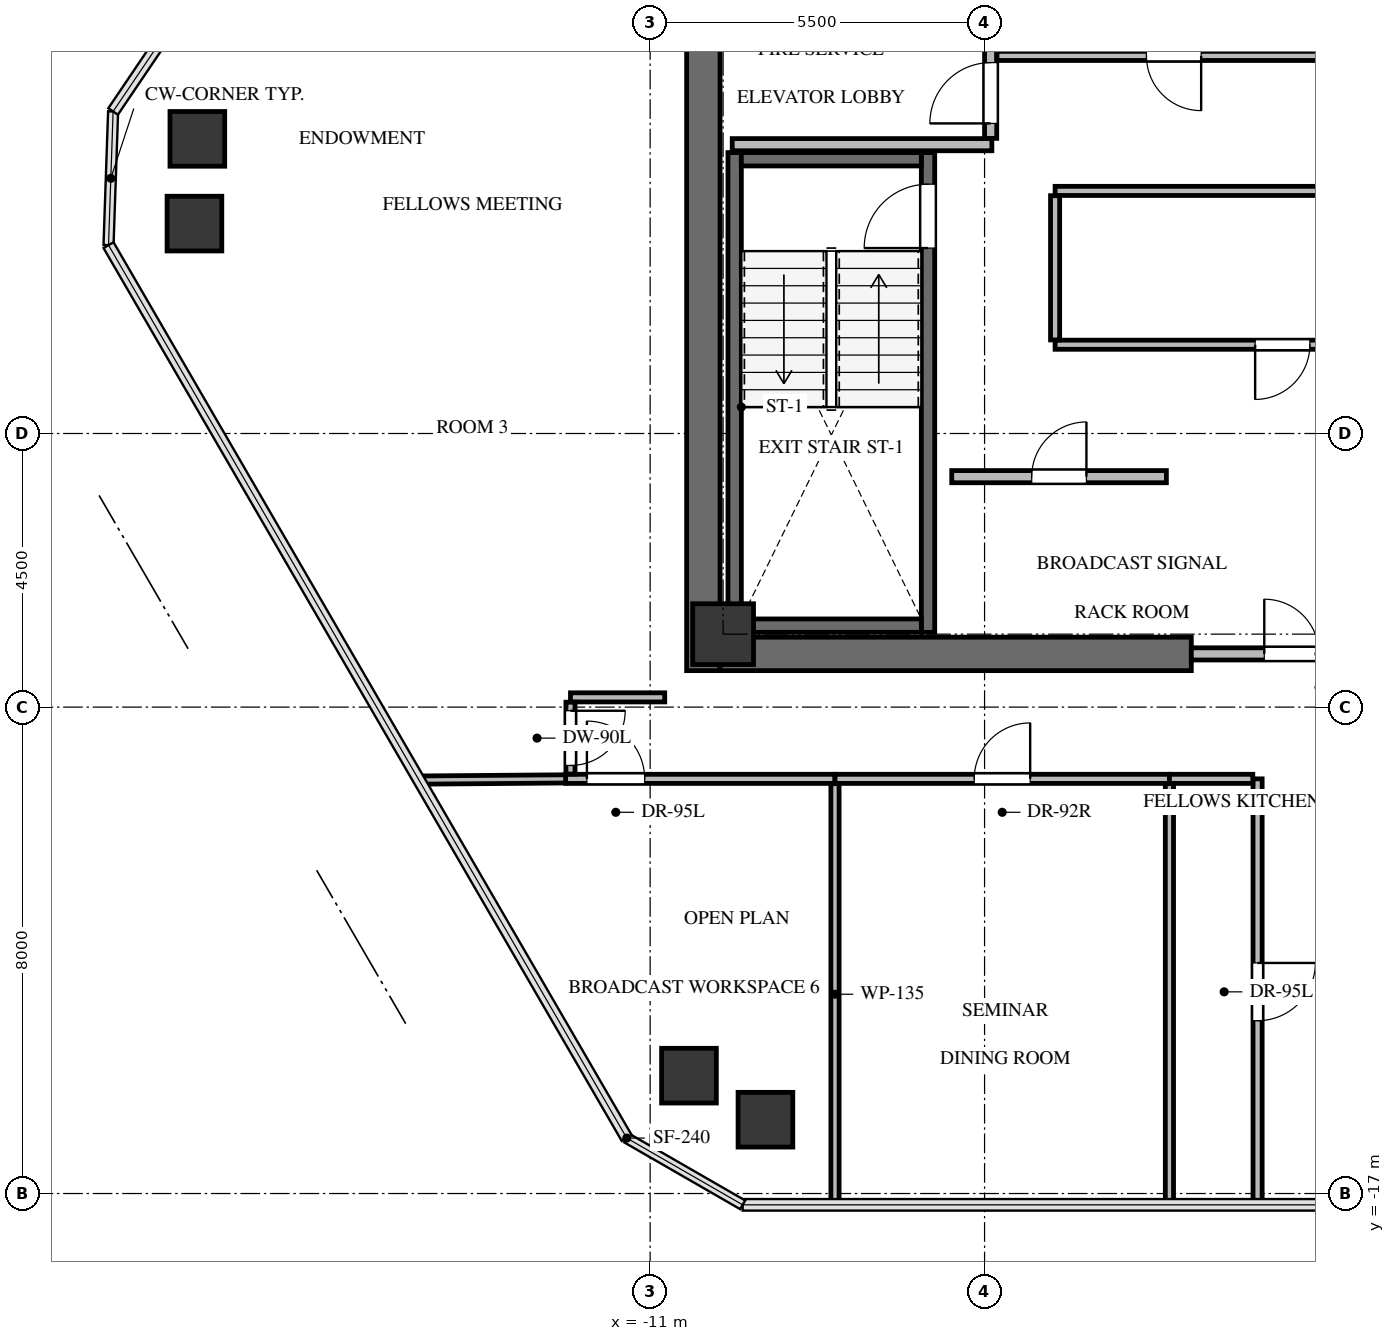
"""IFC4 building model, lengths in metres.
Left out: names, types, materials, properties, quantities, classifications, styles, units other than length and angle.
Written with IfcOpenShell. Run it as: python <this file> out.ifc"""

import sys

from ifc_helpers import new_model, si_unit, direction, frame, frame_2d, origin, origin_2d, place, context, subcontext, project, spatial, rectangle, extrude, source, transform, mapped, element, fill, save


model = new_model("IFC4")
c1 = context("Model", 3, precision=1e-05, world=origin(), true_north=direction((0.0, 1.0)))
c2 = subcontext(c1, "Body", "Model", "MODEL_VIEW")
j1 = project(units=[si_unit("LENGTHUNIT", "METRE"), si_unit("PLANEANGLEUNIT", "RADIAN")], contexts=[c1])
p1 = place(None, origin())
s1 = spatial("IfcSite", under=j1, at=p1, CompositionType="ELEMENT")
p2 = place(p1, origin())
s2 = spatial("IfcBuilding", under=s1, at=p2, CompositionType="ELEMENT")
p3 = place(p2, frame((0.0, 0.0, 251.3)))
s3 = spatial("IfcBuildingStorey", under=s2, at=p3, CompositionType="ELEMENT", Elevation=251.3)
p4 = place(p3, frame((-10.125, -8.4, 0.0), z_axis=(0.0, 0.0, 1.0), x_axis=(0.0, 1.0, 0.0)))
e1 = element("IfcWall", 1, at=p4, inside=s3, PredefinedType="SHEAR", context=c2, shape_type="SweptSolid", body=[
    extrude(rectangle(XDim=16.8, YDim=0.55, at=frame_2d((8.4, 0.0))), origin(), (0.0, 0.0, 1.0), 3.4),
])
p5 = place(p3, frame((-9.85, -8.125, 0.0), z_axis=(0.0, 0.0, 1.0), x_axis=(1.0, 0.0, 0.0)))
e2 = element("IfcWall", 2, at=p5, inside=s3, PredefinedType="SHEAR", context=c2, shape_type="SweptSolid", body=[
    extrude(rectangle(XDim=7.75, YDim=0.55, at=frame_2d((3.875, 0.0))), origin(), (0.0, 0.0, 1.0), 3.4),
])
p6 = place(p3, frame((-6.43, -7.77, -0.24), z_axis=(0.0, 0.0, 1.0), x_axis=(0.0, 1.0, 0.0)))
e3 = element("IfcWall", 3, at=p6, inside=s3, PredefinedType="SHEAR", context=c2, shape_type="SweptSolid", body=[
    extrude(rectangle(XDim=7.89, YDim=0.22, at=frame_2d((3.945, 0.0))), origin(), (0.0, 0.0, 1.0), 3.4),
])
p7 = place(p6, frame((6.32, 0.0, 0.0)))
e4 = element("IfcOpeningElement", 4, at=p7, cuts=e3, PredefinedType="OPENING", context=c2, shape_type="SweptSolid", body=[
    extrude(rectangle(XDim=1.05, YDim=2.15, at=frame_2d((0.525, 1.075))), frame((0.0, 0.12, 0.0), z_axis=(0.0, -1.0, 0.0), x_axis=(1.0, 0.0, 0.0)), (0.0, 0.0, 1.0), 0.24),
])
p8 = place(p3, frame((-9.61, 0.12, -0.24), z_axis=(0.0, 0.0, 1.0), x_axis=(0.0, -1.0, 0.0)))
e5 = element("IfcWall", 5, at=p8, inside=s3, PredefinedType="SHEAR", context=c2, shape_type="SweptSolid", body=[
    extrude(rectangle(XDim=7.89, YDim=0.22, at=frame_2d((3.945, 0.0))), origin(), (0.0, 0.0, 1.0), 3.4),
])
for number, where, z_axis, x_axis in (
    (6, (-9.5, -7.66, -0.24), (0.0, 0.0, 1.0), (1.0, 0.0, 0.0)),
    (7, (-6.54, 0.01, -0.24), (0.0, 0.0, 1.0), (-1.0, 0.0, 0.0)),
):
    element("IfcWall", number, at=place(p3, frame(where, z_axis=z_axis, x_axis=x_axis)), inside=s3, PredefinedType="SHEAR", context=c2, shape_type="SweptSolid", body=[
        extrude(rectangle(XDim=2.96, YDim=0.22, at=frame_2d((1.48, 0.0))), origin(), (0.0, 0.0, 1.0), 3.4),
    ])
m1 = source(origin(), c2, "Body", "SweptSolid", [
    extrude(rectangle(XDim=1.0, YDim=1.0, at=origin_2d()), origin(), (0.0, 0.0, 1.0), 3.4),
])
p9 = place(p3, frame((-9.8, -7.8, -0.24), z_axis=(0.0, 0.0, 1.0), x_axis=(1.0, 0.0, 0.0)))
e8 = element("IfcColumn", 8, at=p9, inside=s3, PredefinedType="COLUMN", context=c2, shape_type="MappedRepresentation", body=[
    mapped(m1, transform((0.0, 0.0, 0.0), x_axis=(1.0, 0.0, 0.0), y_axis=(0.0, 1.0, 0.0), z_axis=(0.0, 0.0, 1.0), scale=1.0)),
])
m2 = source(origin(), c2, "Body", "SweptSolid", [
    extrude(rectangle(XDim=0.9, YDim=0.9, at=origin_2d()), origin(), (0.0, 0.0, 1.0), 3.4),
])
for number, where, z_axis, x_axis in (
    (9, (-10.361, -15.062, -0.24), (0.0, 0.0, 1.0), (1.0, 0.0, 0.0)),
    (10, (-18.494, -1.048, -0.24), (0.0, 0.0, 1.0), (1.0, 0.0, 0.0)),
    (11, (-18.446, 0.346, -0.24), (0.0, 0.0, 1.0), (1.0, 0.0, 0.0)),
    (12, (-9.104, -15.786, -0.24), (0.0, 0.0, 1.0), (1.0, 0.0, 0.0)),
):
    element("IfcColumn", number, at=place(p3, frame(where, z_axis=z_axis, x_axis=x_axis)), inside=s3, PredefinedType="COLUMN", context=c2, shape_type="MappedRepresentation", body=[
        mapped(m2, transform((0.0, 0.0, 0.0), x_axis=(1.0, 0.0, 0.0), y_axis=(0.0, 1.0, 0.0), z_axis=(0.0, 0.0, 1.0), scale=1.0)),
    ])
p10 = place(p3, frame((-2.1, -8.125, 0.0), z_axis=(0.0, 0.0, 1.0), x_axis=(1.0, 0.0, 0.0)))
e13 = element("IfcWall", 13, at=p10, inside=s3, PredefinedType="SOLIDWALL", context=c2, shape_type="SweptSolid", body=[
    extrude(rectangle(XDim=4.2, YDim=0.2, at=frame_2d((2.1, 0.0))), origin(), (0.0, 0.0, 1.0), 3.145),
])
p11 = place(p10, frame((1.2, 0.0, 0.0)))
e14 = element("IfcOpeningElement", 14, at=p11, cuts=e13, PredefinedType="OPENING", context=c2, shape_type="SweptSolid", body=[
    extrude(rectangle(XDim=1.8, YDim=2.15, at=frame_2d((0.9, 1.075))), frame((0.0, 0.11, 0.0), z_axis=(0.0, -1.0, 0.0), x_axis=(1.0, 0.0, 0.0)), (0.0, 0.0, 1.0), 0.22),
])
p12 = place(p3, frame((-9.65, 0.25, 0.0), z_axis=(0.0, 0.0, 1.0), x_axis=(1.0, 0.0, 0.0)))
e15 = element("IfcWall", 15, at=p12, inside=s3, PredefinedType="SOLIDWALL", context=c2, shape_type="SweptSolid", body=[
    extrude(rectangle(XDim=4.27, YDim=0.2, at=frame_2d((2.135, 0.0))), origin(), (0.0, 0.0, 1.0), 3.145),
])
p13 = place(p3, frame((-5.4, 0.354, 0.0), z_axis=(0.0, 0.0, 1.0), x_axis=(0.0, 1.0, 0.0)))
e16 = element("IfcWall", 16, at=p13, inside=s3, PredefinedType="SOLIDWALL", context=c2, shape_type="SweptSolid", body=[
    extrude(rectangle(XDim=4.026, YDim=0.2, at=frame_2d((2.013, 0.0))), origin(), (0.0, 0.0, 1.0), 3.145),
])
p14 = place(p13, frame((0.246, 0.0, 0.0)))
e17 = element("IfcOpeningElement", 17, at=p14, cuts=e16, PredefinedType="OPENING", context=c2, shape_type="SweptSolid", body=[
    extrude(rectangle(XDim=1.0, YDim=2.15, at=frame_2d((0.5, 1.075))), frame((0.0, 0.11, 0.0), z_axis=(0.0, -1.0, 0.0), x_axis=(1.0, 0.0, 0.0)), (0.0, 0.0, 1.0), 0.22),
])
p15 = place(p3, frame((-6.04, -5.21, 0.0), z_axis=(0.0, 0.0, 1.0), x_axis=(1.0, 0.0, 0.0)))
e18 = element("IfcWall", 18, at=p15, inside=s3, PredefinedType="SOLIDWALL", context=c2, shape_type="SweptSolid", body=[
    extrude(rectangle(XDim=3.53, YDim=0.2, at=frame_2d((1.765, 0.0))), origin(), (0.0, 0.0, 1.0), 3.145),
])
p16 = place(p15, frame((1.315, 0.0, 0.0)))
e19 = element("IfcOpeningElement", 19, at=p16, cuts=e18, PredefinedType="OPENING", context=c2, shape_type="SweptSolid", body=[
    extrude(rectangle(XDim=0.9, YDim=2.05, at=frame_2d((0.45, 1.025))), frame((0.0, 0.11, 0.0), z_axis=(0.0, -1.0, 0.0), x_axis=(1.0, 0.0, 0.0)), (0.0, 0.0, 1.0), 0.22),
])
p17 = place(p3, frame((3.14, -3.04, 0.0), z_axis=(0.0, 0.0, 1.0), x_axis=(-1.0, 0.0, 0.0)))
e20 = element("IfcWall", 20, at=p17, inside=s3, PredefinedType="PARTITIONING", context=c2, shape_type="SweptSolid", body=[
    extrude(rectangle(XDim=7.48, YDim=0.15, at=frame_2d((3.74, 0.0))), origin(), (0.0, 0.0, 1.0), 3.145),
])
p18 = place(p17, frame((3.29, 0.0, 0.0)))
e21 = element("IfcOpeningElement", 21, at=p18, cuts=e20, PredefinedType="OPENING", context=c2, shape_type="SweptSolid", body=[
    extrude(rectangle(XDim=0.9, YDim=2.05, at=frame_2d((0.45, 1.025))), frame((0.0, 0.085, 0.0), z_axis=(0.0, -1.0, 0.0), x_axis=(1.0, 0.0, 0.0)), (0.0, 0.0, 1.0), 0.17),
])
p19 = place(p3, frame((-4.34, -0.51, 0.0), z_axis=(0.0, 0.0, 1.0), x_axis=(1.0, 0.0, 0.0)))
e22 = element("IfcWall", 22, at=p19, inside=s3, PredefinedType="PARTITIONING", context=c2, shape_type="SweptSolid", body=[
    extrude(rectangle(XDim=7.48, YDim=0.15, at=frame_2d((3.74, 0.0))), origin(), (0.0, 0.0, 1.0), 3.145),
])
p20 = place(p3, frame((-4.34, -2.961, 0.0), z_axis=(0.0, 0.0, 1.0), x_axis=(0.0, 1.0, 0.0)))
e23 = element("IfcWall", 23, at=p20, inside=s3, PredefinedType="PARTITIONING", context=c2, shape_type="SweptSolid", body=[
    extrude(rectangle(XDim=2.372, YDim=0.15, at=frame_2d((1.186, 0.0))), origin(), (0.0, 0.0, 1.0), 3.145),
])
p21 = place(p3, frame((0.52, 1.71, 0.0), z_axis=(0.0, 0.0, 1.0), x_axis=(-1.0, 0.0, 0.0)))
e24 = element("IfcWall", 24, at=p21, inside=s3, PredefinedType="PARTITIONING", context=c2, shape_type="SweptSolid", body=[
    extrude(rectangle(XDim=5.816, YDim=0.15, at=frame_2d((2.908, 0.0))), origin(), (0.0, 0.0, 1.0), 3.145),
])
p22 = place(p21, frame((2.458, 0.0, 0.0)))
e25 = element("IfcOpeningElement", 25, at=p22, cuts=e24, PredefinedType="OPENING", context=c2, shape_type="SweptSolid", body=[
    extrude(rectangle(XDim=0.9, YDim=2.05, at=frame_2d((0.45, 1.025))), frame((0.0, 0.085, 0.0), z_axis=(0.0, -1.0, 0.0), x_axis=(1.0, 0.0, 0.0)), (0.0, 0.0, 1.0), 0.17),
])
p23 = place(p3, frame((-12.39, -10.18, 0.0), z_axis=(0.0, 0.0, 1.0), x_axis=(1.0, 0.0, 0.0)))
e26 = element("IfcWall", 26, at=p23, inside=s3, PredefinedType="PARTITIONING", context=c2, shape_type="SweptSolid", body=[
    extrude(rectangle(XDim=4.43, YDim=0.15, at=frame_2d((2.215, 0.0))), origin(), (0.0, 0.0, 1.0), 3.145),
])
p24 = place(p23, frame((0.35, 0.0, 0.0)))
e27 = element("IfcOpeningElement", 27, at=p24, cuts=e26, PredefinedType="OPENING", context=c2, shape_type="SweptSolid", body=[
    extrude(rectangle(XDim=0.95, YDim=2.1, at=frame_2d((0.475, 1.05))), frame((0.0, 0.085, 0.0), z_axis=(0.0, -1.0, 0.0), x_axis=(1.0, 0.0, 0.0)), (0.0, 0.0, 1.0), 0.17),
])
p25 = place(p3, frame((-7.96, -10.18, 0.0), z_axis=(0.0, 0.0, 1.0), x_axis=(1.0, 0.0, 0.0)))
e28 = element("IfcWall", 28, at=p25, inside=s3, PredefinedType="PARTITIONING", context=c2, shape_type="SweptSolid", body=[
    extrude(rectangle(XDim=5.5, YDim=0.15, at=frame_2d((2.75, 0.0))), origin(), (0.0, 0.0, 1.0), 2.401),
])
p26 = place(p25, frame((2.29, 0.0, 0.0)))
e29 = element("IfcOpeningElement", 29, at=p26, cuts=e28, PredefinedType="OPENING", context=c2, shape_type="SweptSolid", body=[
    extrude(rectangle(XDim=0.92, YDim=2.1, at=frame_2d((0.46, 1.05))), frame((0.0, 0.085, 0.0), z_axis=(0.0, -1.0, 0.0), x_axis=(1.0, 0.0, 0.0)), (0.0, 0.0, 1.0), 0.17),
])
p27 = place(p3, frame((-1.01, -10.18, 0.0), z_axis=(0.0, 0.0, 1.0), x_axis=(0.0, -1.0, 0.0)))
e30 = element("IfcWall", 30, at=p27, inside=s3, PredefinedType="PARTITIONING", context=c2, shape_type="SweptSolid", body=[
    extrude(rectangle(XDim=7.006, YDim=0.15, at=frame_2d((3.503, 0.0))), origin(), (0.0, 0.0, 1.0), 2.499),
])
p28 = place(p27, frame((3.028, 0.0, 0.0)))
e31 = element("IfcOpeningElement", 31, at=p28, cuts=e30, PredefinedType="OPENING", context=c2, shape_type="SweptSolid", body=[
    extrude(rectangle(XDim=0.95, YDim=2.1, at=frame_2d((0.475, 1.05))), frame((0.0, 0.085, 0.0), z_axis=(0.0, -1.0, 0.0), x_axis=(1.0, 0.0, 0.0)), (0.0, 0.0, 1.0), 0.17),
])
p29 = place(p3, frame((-2.46, -10.18, 0.0), z_axis=(0.0, 0.0, 1.0), x_axis=(1.0, 0.0, 0.0)))
e32 = element("IfcWall", 32, at=p29, inside=s3, PredefinedType="PARTITIONING", context=c2, shape_type="SweptSolid", body=[
    extrude(rectangle(XDim=1.371, YDim=0.15, at=frame_2d((0.686, 0.0))), origin(), (0.0, 0.0, 1.0), 3.145),
])
p30 = place(p3, frame((-10.76, -8.84, 0.0), z_axis=(0.0, 0.0, 1.0), x_axis=(-1.0, 0.0, 0.0)))
e33 = element("IfcWall", 33, at=p30, inside=s3, PredefinedType="PARTITIONING", context=c2, shape_type="SweptSolid", body=[
    extrude(rectangle(XDim=1.55, YDim=0.15, at=frame_2d((0.775, 0.0))), origin(), (0.0, 0.0, 1.0), 3.145),
])
p31 = place(p3, frame((-12.31, -8.919, 0.0), z_axis=(0.0, 0.0, 1.0), x_axis=(0.0, -1.0, 0.0)))
e34 = element("IfcWall", 34, at=p31, inside=s3, PredefinedType="PARTITIONING", context=c2, shape_type="SweptSolid", body=[
    extrude(rectangle(XDim=1.182, YDim=0.15, at=frame_2d((0.591, 0.0))), origin(), (0.0, 0.0, 1.0), 3.145),
])
p32 = place(p31, frame((0.141, 0.0, 0.0)))
e35 = element("IfcOpeningElement", 35, at=p32, cuts=e34, PredefinedType="OPENING", context=c2, shape_type="SweptSolid", body=[
    extrude(rectangle(XDim=0.9, YDim=2.05, at=frame_2d((0.45, 1.025))), frame((0.0, 0.085, 0.0), z_axis=(0.0, -1.0, 0.0), x_axis=(1.0, 0.0, 0.0)), (0.0, 0.0, 1.0), 0.17),
])
p33 = place(p3, frame((-7.96, -10.259, 0.0), z_axis=(0.0, 0.0, 1.0), x_axis=(0.0, -1.0, 0.0)))
e36 = element("IfcWall", 36, at=p33, inside=s3, PredefinedType="PARTITIONING", context=c2, shape_type="SweptSolid", body=[
    extrude(rectangle(XDim=6.927, YDim=0.135, at=frame_2d((3.463, 0.0))), origin(), (0.0, 0.0, 1.0), 2.401),
])
p34 = place(p3, frame((-14.802, -10.2, 0.0), z_axis=(0.0, 0.0, 1.0), x_axis=(0.999968020968, 0.007997314604, 0.0)))
e37 = element("IfcWall", 37, at=p34, inside=s3, PredefinedType="PARTITIONING", context=c2, shape_type="SweptSolid", body=[
    extrude(rectangle(XDim=2.412, YDim=0.135, at=frame_2d((1.206, 0.0))), origin(), (0.0, 0.0, 1.0), 2.499),
])
p35 = place(p3, frame((-2.46, -10.259, 0.0), z_axis=(0.0, 0.0, 1.0), x_axis=(0.0, -1.0, 0.0)))
e38 = element("IfcWall", 38, at=p35, inside=s3, PredefinedType="PARTITIONING", context=c2, shape_type="SweptSolid", body=[
    extrude(rectangle(XDim=6.927, YDim=0.135, at=frame_2d((3.463, 0.0))), origin(), (0.0, 0.0, 1.0), 2.499),
])
m3 = source(origin(), c2, "Body", "SweptSolid", [
    extrude(rectangle(XDim=1.05, YDim=2.15, at=frame_2d((0.525, 1.075))), frame((0.0, 0.025, 0.0), z_axis=(0.0, -1.0, 0.0), x_axis=(1.0, 0.0, 0.0)), (0.0, 0.0, 1.0), 0.05),
])
p36 = place(p7, origin())
e39 = element("IfcDoor", 39, at=p36, inside=s3, OperationType="SINGLE_SWING_LEFT", PredefinedType="DOOR", context=c2, shape_type="MappedRepresentation", body=[
    mapped(m3, transform((0.0, 0.0, 0.0), x_axis=(1.0, 0.0, 0.0), y_axis=(0.0, 1.0, 0.0), z_axis=(0.0, 0.0, 1.0), scale=1.0)),
])
fill(e4, e39)
m4 = source(origin(), c2, "Body", "SweptSolid", [
    extrude(rectangle(XDim=1.8, YDim=2.15, at=frame_2d((0.9, 1.075))), frame((0.0, 0.025, 0.0), z_axis=(0.0, -1.0, 0.0), x_axis=(1.0, 0.0, 0.0)), (0.0, 0.0, 1.0), 0.05),
])
p37 = place(p11, origin())
e40 = element("IfcDoor", 40, at=p37, inside=s3, OperationType="DOUBLE_DOOR_SINGLE_SWING", PredefinedType="DOOR", context=c2, shape_type="MappedRepresentation", body=[
    mapped(m4, transform((0.0, 0.0, 0.0), x_axis=(1.0, 0.0, 0.0), y_axis=(0.0, 1.0, 0.0), z_axis=(0.0, 0.0, 1.0), scale=1.0)),
])
fill(e14, e40)
m5 = source(origin(), c2, "Body", "SweptSolid", [
    extrude(rectangle(XDim=1.0, YDim=2.15, at=frame_2d((0.5, 1.075))), frame((0.0, 0.025, 0.0), z_axis=(0.0, -1.0, 0.0), x_axis=(1.0, 0.0, 0.0)), (0.0, 0.0, 1.0), 0.05),
])
p38 = place(p14, origin())
e41 = element("IfcDoor", 41, at=p38, inside=s3, OperationType="SINGLE_SWING_LEFT", PredefinedType="DOOR", context=c2, shape_type="MappedRepresentation", body=[
    mapped(m5, transform((0.0, 0.0, 0.0), x_axis=(1.0, 0.0, 0.0), y_axis=(0.0, 1.0, 0.0), z_axis=(0.0, 0.0, 1.0), scale=1.0)),
])
fill(e17, e41)
m6 = source(origin(), c2, "Body", "SweptSolid", [
    extrude(rectangle(XDim=0.9, YDim=2.05, at=frame_2d((0.45, 1.025))), frame((0.0, 0.025, 0.0), z_axis=(0.0, -1.0, 0.0), x_axis=(1.0, 0.0, 0.0)), (0.0, 0.0, 1.0), 0.05),
])
p39 = place(p16, origin())
e42 = element("IfcDoor", 42, at=p39, inside=s3, OperationType="SINGLE_SWING_RIGHT", PredefinedType="DOOR", context=c2, shape_type="MappedRepresentation", body=[
    mapped(m6, transform((0.0, 0.0, 0.0), x_axis=(1.0, 0.0, 0.0), y_axis=(0.0, 1.0, 0.0), z_axis=(0.0, 0.0, 1.0), scale=1.0)),
])
fill(e19, e42)
p40 = place(p18, origin())
e43 = element("IfcDoor", 43, at=p40, inside=s3, OperationType="SINGLE_SWING_RIGHT", PredefinedType="DOOR", context=c2, shape_type="MappedRepresentation", body=[
    mapped(m6, transform((0.0, 0.0, 0.0), x_axis=(1.0, 0.0, 0.0), y_axis=(0.0, 1.0, 0.0), z_axis=(0.0, 0.0, 1.0), scale=1.0)),
])
fill(e21, e43)
m7 = source(origin(), c2, "Body", "SweptSolid", [
    extrude(rectangle(XDim=0.9, YDim=2.05, at=frame_2d((0.45, 1.025))), frame((0.0, 0.025, 0.0), z_axis=(0.0, -1.0, 0.0), x_axis=(1.0, 0.0, 0.0)), (0.0, 0.0, 1.0), 0.05),
])
p41 = place(p22, origin())
e44 = element("IfcDoor", 44, at=p41, inside=s3, OperationType="SINGLE_SWING_LEFT", PredefinedType="DOOR", context=c2, shape_type="MappedRepresentation", body=[
    mapped(m7, transform((0.0, 0.0, 0.0), x_axis=(1.0, 0.0, 0.0), y_axis=(0.0, 1.0, 0.0), z_axis=(0.0, 0.0, 1.0), scale=1.0)),
])
fill(e25, e44)
m8 = source(origin(), c2, "Body", "SweptSolid", [
    extrude(rectangle(XDim=0.95, YDim=2.1, at=frame_2d((0.475, 1.05))), frame((0.0, 0.025, 0.0), z_axis=(0.0, -1.0, 0.0), x_axis=(1.0, 0.0, 0.0)), (0.0, 0.0, 1.0), 0.05),
])
p42 = place(p24, origin())
e45 = element("IfcDoor", 45, at=p42, inside=s3, OperationType="SINGLE_SWING_LEFT", PredefinedType="DOOR", context=c2, shape_type="MappedRepresentation", body=[
    mapped(m8, transform((0.0, 0.0, 0.0), x_axis=(1.0, 0.0, 0.0), y_axis=(0.0, 1.0, 0.0), z_axis=(0.0, 0.0, 1.0), scale=1.0)),
])
fill(e27, e45)
m9 = source(origin(), c2, "Body", "SweptSolid", [
    extrude(rectangle(XDim=0.92, YDim=2.1, at=frame_2d((0.46, 1.05))), frame((0.0, 0.025, 0.0), z_axis=(0.0, -1.0, 0.0), x_axis=(1.0, 0.0, 0.0)), (0.0, 0.0, 1.0), 0.05),
])
p43 = place(p26, origin())
e46 = element("IfcDoor", 46, at=p43, inside=s3, OperationType="SINGLE_SWING_RIGHT", PredefinedType="DOOR", context=c2, shape_type="MappedRepresentation", body=[
    mapped(m9, transform((0.0, 0.0, 0.0), x_axis=(1.0, 0.0, 0.0), y_axis=(0.0, 1.0, 0.0), z_axis=(0.0, 0.0, 1.0), scale=1.0)),
])
fill(e29, e46)
p44 = place(p28, origin())
e47 = element("IfcDoor", 47, at=p44, inside=s3, OperationType="SINGLE_SWING_LEFT", PredefinedType="DOOR", context=c2, shape_type="MappedRepresentation", body=[
    mapped(m8, transform((0.0, 0.0, 0.0), x_axis=(1.0, 0.0, 0.0), y_axis=(0.0, 1.0, 0.0), z_axis=(0.0, 0.0, 1.0), scale=1.0)),
])
fill(e31, e47)
m10 = source(origin(), c2, "Body", "SweptSolid", [
    extrude(rectangle(XDim=0.9, YDim=2.05, at=frame_2d((0.45, 1.025))), frame((0.0, 0.025, 0.0), z_axis=(0.0, -1.0, 0.0), x_axis=(1.0, 0.0, 0.0)), (0.0, 0.0, 1.0), 0.05),
])
p45 = place(p32, origin())
e48 = element("IfcDoor", 48, at=p45, inside=s3, OperationType="SINGLE_SWING_LEFT", PredefinedType="DOOR", context=c2, shape_type="MappedRepresentation", body=[
    mapped(m10, transform((0.0, 0.0, 0.0), x_axis=(1.0, 0.0, 0.0), y_axis=(0.0, 1.0, 0.0), z_axis=(0.0, 0.0, 1.0), scale=1.0)),
])
fill(e35, e48)
save(model, sys.argv[1])
